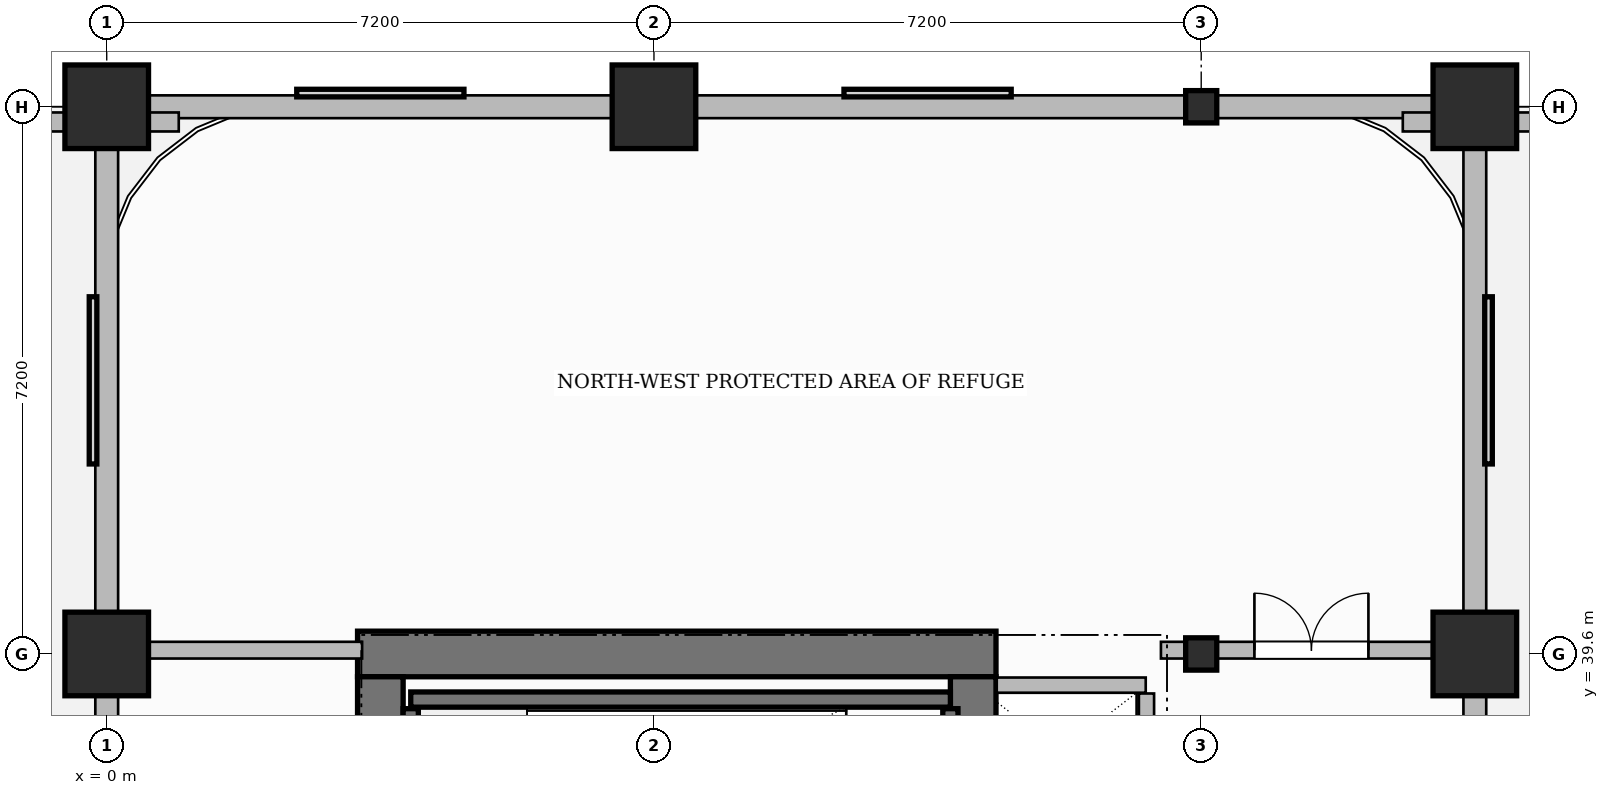
"""IFC4 building model, lengths in metres.
Left out: names, types, materials, properties, quantities, classifications, styles, units other than length and angle.
Written with IfcOpenShell. Run it as: python <this file> out.ifc"""

import sys

from ifc_helpers import new_model, si_unit, direction, frame, frame_2d, origin, origin_2d, place, context, subcontext, project, spatial, rectangle, i_section, extrude, source, transform, mapped, element, fill, save


model = new_model("IFC4")
c1 = context("Model", 3, precision=1e-05, world=origin(), true_north=direction((0.0, 1.0)))
c2 = subcontext(c1, "Body", "Model", "MODEL_VIEW")
j1 = project(units=[si_unit("LENGTHUNIT", "METRE"), si_unit("PLANEANGLEUNIT", "RADIAN")], contexts=[c1])
p1 = place(None, origin())
s1 = spatial("IfcSite", under=j1, at=p1, CompositionType="ELEMENT")
p2 = place(p1, origin())
s2 = spatial("IfcBuilding", under=s1, at=p2, CompositionType="ELEMENT")
p3 = place(p2, frame((0.0, 0.0, 27.0)))
s3 = spatial("IfcBuildingStorey", under=s2, at=p3, CompositionType="ELEMENT", Elevation=27.0)
p4 = place(p3, frame((3.3, 39.6, 0.0), z_axis=(0.0, 0.0, 1.0), x_axis=(1.0, 0.0, 0.0)))
e1 = element("IfcWall", 1, at=p4, inside=s3, PredefinedType="SHEAR", context=c2, shape_type="SweptSolid", body=[
    extrude(rectangle(XDim=8.4, YDim=0.6, at=frame_2d((4.2, 0.0))), origin(), (0.0, 0.0, 1.0), 5.4),
])
p5 = place(p3, frame((3.6, 25.5, 0.0), z_axis=(0.0, 0.0, 1.0), x_axis=(0.0, 1.0, 0.0)))
e2 = element("IfcWall", 2, at=p5, inside=s3, PredefinedType="SHEAR", context=c2, shape_type="SweptSolid", body=[
    extrude(rectangle(XDim=13.8, YDim=0.6, at=frame_2d((6.9, 0.0))), origin(), (0.0, 0.0, 1.0), 5.4),
])
p6 = place(p3, frame((11.4, 25.5, 0.0), z_axis=(0.0, 0.0, 1.0), x_axis=(0.0, 1.0, 0.0)))
e3 = element("IfcWall", 3, at=p6, inside=s3, PredefinedType="SHEAR", context=c2, shape_type="SweptSolid", body=[
    extrude(rectangle(XDim=13.8, YDim=0.6, at=frame_2d((6.9, 0.0))), origin(), (0.0, 0.0, 1.0), 5.4),
])
p7 = place(p6, frame((6.47, 0.0, 0.0)))
e4 = element("IfcOpeningElement", 4, at=p7, cuts=e3, PredefinedType="OPENING", context=c2, shape_type="SweptSolid", body=[
    extrude(rectangle(XDim=1.5, YDim=2.2, at=frame_2d((0.75, 1.1))), frame((0.0, 0.31, 0.0), z_axis=(0.0, -1.0, 0.0), x_axis=(1.0, 0.0, 0.0)), (0.0, 0.0, 1.0), 0.62),
])
m1 = source(origin(), c2, "Body", "SweptSolid", [
    extrude(rectangle(XDim=1.1, YDim=1.1, at=origin_2d()), origin(), (0.0, 0.0, 1.0), 5.4),
])
for number, where, z_axis, x_axis in (
    (5, (0.0, 39.6, 0.0), (0.0, 0.0, 1.0), (1.0, 0.0, 0.0)),
    (6, (0.0, 46.8, 0.0), (0.0, 0.0, 1.0), (1.0, 0.0, 0.0)),
    (7, (7.2, 46.8, 0.0), (0.0, 0.0, 1.0), (1.0, 0.0, 0.0)),
):
    element("IfcColumn", number, at=place(p3, frame(where, z_axis=z_axis, x_axis=x_axis)), inside=s3, PredefinedType="COLUMN", context=c2, shape_type="MappedRepresentation", body=[
        mapped(m1, transform((0.0, 0.0, 0.0), scale=1.0)),
    ])
m2 = source(origin(), c2, "Body", "SweptSolid", [
    extrude(i_section(OverallWidth=0.409, OverallDepth=0.425, WebThickness=0.024, FlangeThickness=0.039, FilletRadius=0.015, at=origin_2d()), origin(), (0.0, 0.0, 1.0), 5.4),
])
for number, where, z_axis, x_axis in (
    (8, (14.4, 39.6, 0.0), (0.0, 0.0, 1.0), (1.0, 0.0, 0.0)),
    (9, (14.4, 46.8, 0.0), (0.0, 0.0, 1.0), (1.0, 0.0, 0.0)),
):
    element("IfcColumn", number, at=place(p3, frame(where, z_axis=z_axis, x_axis=x_axis)), inside=s3, PredefinedType="COLUMN", context=c2, shape_type="MappedRepresentation", body=[
        mapped(m2, transform((0.0, 0.0, 0.0), scale=1.0)),
    ])
for number, where, z_axis, x_axis in (
    (10, (18.0, 39.6, 0.0), (0.0, 0.0, 1.0), (1.0, 0.0, 0.0)),
    (11, (18.0, 46.8, 0.0), (0.0, 0.0, 1.0), (1.0, 0.0, 0.0)),
):
    element("IfcColumn", number, at=place(p3, frame(where, z_axis=z_axis, x_axis=x_axis)), inside=s3, PredefinedType="COLUMN", context=c2, shape_type="MappedRepresentation", body=[
        mapped(m1, transform((0.0, 0.0, 0.0), scale=1.0)),
    ])
p8 = place(p3, frame((4.0, 39.0, 0.0), z_axis=(0.0, 0.0, 1.0), x_axis=(1.0, 0.0, 0.0)))
e12 = element("IfcWall", 12, at=p8, inside=s3, PredefinedType="SHEAR", context=c2, shape_type="SweptSolid", body=[
    extrude(rectangle(XDim=7.1, YDim=0.2, at=frame_2d((3.55, 0.0))), origin(), (0.0, 0.0, 1.0), 5.4),
])
for number, where, z_axis, x_axis in (
    (13, (4.0, 36.18, 0.0), (0.0, 0.0, 1.0), (0.0, 1.0, 0.0)),
    (14, (11.1, 36.18, 0.0), (0.0, 0.0, 1.0), (0.0, 1.0, 0.0)),
):
    element("IfcWall", number, at=place(p3, frame(where, z_axis=z_axis, x_axis=x_axis)), inside=s3, PredefinedType="SHEAR", context=c2, shape_type="SweptSolid", body=[
        extrude(rectangle(XDim=2.7, YDim=0.2, at=frame_2d((1.35, 0.0))), origin(), (0.0, 0.0, 1.0), 5.4),
    ])
p9 = place(p3, frame((11.71, 39.19, 0.0), z_axis=(0.0, 0.0, 1.0), x_axis=(1.0, 0.0, 0.0)))
e15 = element("IfcWall", 15, at=p9, inside=s3, PredefinedType="PARTITIONING", context=c2, shape_type="SweptSolid", body=[
    extrude(rectangle(XDim=1.96, YDim=0.2, at=frame_2d((0.98, 0.0))), origin(), (0.0, 0.0, 1.0), 5.15),
])
p10 = place(p3, frame((13.68, 34.36, 0.0), z_axis=(0.0, 0.0, 1.0), x_axis=(0.0, 1.0, 0.0)))
e16 = element("IfcWall", 16, at=p10, inside=s3, PredefinedType="PARTITIONING", context=c2, shape_type="SweptSolid", body=[
    extrude(rectangle(XDim=4.72, YDim=0.2, at=frame_2d((2.36, 0.0))), origin(), (0.0, 0.0, 1.0), 5.15),
])
p11 = place(p3, frame((13.87, 39.65, 0.0), z_axis=(0.0, 0.0, 1.0), x_axis=(1.0, 0.0, 0.0)))
e17 = element("IfcWall", 17, at=p11, inside=s3, PredefinedType="PARTITIONING", context=c2, shape_type="SweptSolid", body=[
    extrude(rectangle(XDim=3.89, YDim=0.22, at=frame_2d((1.945, 0.0))), origin(), (0.0, 0.0, 1.0), 4.485),
])
p12 = place(p11, frame((1.23, 0.0, 0.0)))
e18 = element("IfcOpeningElement", 18, at=p12, cuts=e17, PredefinedType="OPENING", context=c2, shape_type="SweptSolid", body=[
    extrude(rectangle(XDim=1.5, YDim=2.2, at=frame_2d((0.75, 1.1))), frame((0.0, 0.12, 0.0), z_axis=(0.0, -1.0, 0.0), x_axis=(1.0, 0.0, 0.0)), (0.0, 0.0, 1.0), 0.24),
])
p13 = place(p3, frame((0.29, 39.65, 0.0), z_axis=(0.0, 0.0, 1.0), x_axis=(1.0, 0.0, 0.0)))
e19 = element("IfcWall", 19, at=p13, inside=s3, PredefinedType="PARTITIONING", context=c2, shape_type="SweptSolid", body=[
    extrude(rectangle(XDim=3.07, YDim=0.22, at=frame_2d((1.535, 0.0))), origin(), (0.0, 0.0, 1.0), 5.15),
])
p14 = place(p3, frame((0.0, 25.25, 0.0), z_axis=(0.0, 0.0, 1.0), x_axis=(0.0, 1.0, 0.0)))
e20 = element("IfcWall", 20, at=p14, inside=s3, PredefinedType="SOLIDWALL", context=c2, shape_type="SweptSolid", body=[
    extrude(rectangle(XDim=21.5, YDim=0.3, at=frame_2d((10.75, 0.0))), origin(), (0.0, 0.0, 1.0), 4.485),
])
p15 = place(p3, frame((0.0, 46.8, 0.0), z_axis=(0.0, 0.0, 1.0), x_axis=(1.0, 0.0, 0.0)))
e21 = element("IfcWall", 21, at=p15, inside=s3, PredefinedType="SOLIDWALL", context=c2, shape_type="SweptSolid", body=[
    extrude(rectangle(XDim=18.0, YDim=0.3, at=frame_2d((9.0, 0.0))), origin(), (0.0, 0.0, 1.0), 4.485),
])
p16 = place(p3, frame((18.0, 32.4, 0.0), z_axis=(0.0, 0.0, 1.0), x_axis=(0.0, 1.0, 0.0)))
e22 = element("IfcWall", 22, at=p16, inside=s3, PredefinedType="SOLIDWALL", context=c2, shape_type="SweptSolid", body=[
    extrude(rectangle(XDim=14.35, YDim=0.3, at=frame_2d((7.175, 0.0))), origin(), (0.0, 0.0, 1.0), 5.15),
])
p17 = place(p3, frame((17.052, 46.6, 0.0), z_axis=(0.0, 0.0, 1.0), x_axis=(1.0, 0.0, 0.0)))
e23 = element("IfcWall", 23, at=p17, inside=s3, PredefinedType="PARAPET", context=c2, shape_type="SweptSolid", body=[
    extrude(rectangle(XDim=60.935, YDim=0.25, at=frame_2d((30.467, 0.0))), origin(), (0.0, 0.0, 1.0), 0.95),
])
p18 = place(p3, frame((-2.387, 46.6, 0.0), z_axis=(0.0, 0.0, 1.0), x_axis=(1.0, 0.0, 0.0)))
e24 = element("IfcWall", 24, at=p18, inside=s3, PredefinedType="PARAPET", context=c2, shape_type="SweptSolid", body=[
    extrude(rectangle(XDim=3.335, YDim=0.25, at=frame_2d((1.667, 0.0))), origin(), (0.0, 0.0, 1.0), 0.95),
])
m3 = source(origin(), c2, "Body", "SweptSolid", [
    extrude(rectangle(XDim=1.5, YDim=2.2, at=frame_2d((0.75, 1.1))), frame((0.0, 0.025, 0.0), z_axis=(0.0, -1.0, 0.0), x_axis=(1.0, 0.0, 0.0)), (0.0, 0.0, 1.0), 0.05),
])
p19 = place(p12, origin())
e25 = element("IfcDoor", 25, at=p19, inside=s3, OperationType="DOUBLE_DOOR_SINGLE_SWING", PredefinedType="DOOR", context=c2, shape_type="MappedRepresentation", body=[
    mapped(m3, transform((0.0, 0.0, 0.0), scale=1.0)),
])
fill(e18, e25)
save(model, sys.argv[1])
